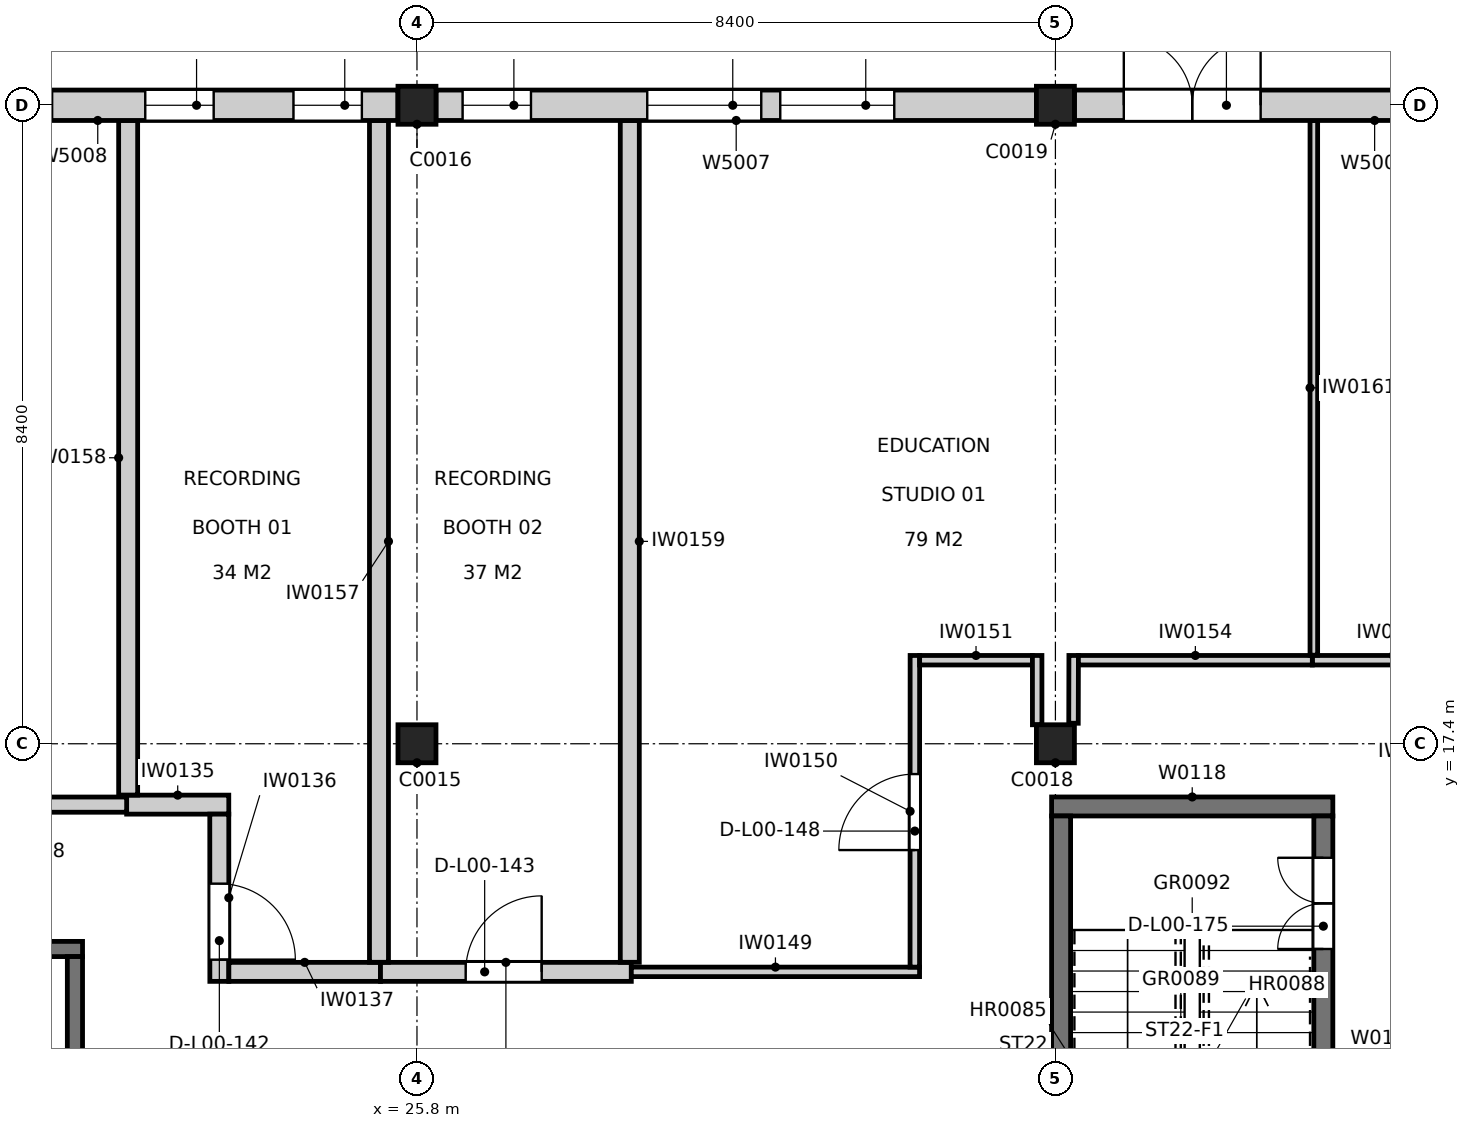
"""IFC4 building model, lengths in metres.
Left out: names, types, materials, properties, quantities, classifications, styles, units other than length and angle.
Written with IfcOpenShell. Run it as: python <this file> out.ifc"""

import sys

from ifc_helpers import new_model, si_unit, direction, frame, frame_2d, origin, origin_2d, place, context, subcontext, project, spatial, rectangle, extrude, element, fill, save


model = new_model("IFC4")
c1 = context("Model", 3, precision=1e-05, world=origin(), true_north=direction((0.0, 1.0)))
c2 = subcontext(c1, "Body", "Model", "MODEL_VIEW")
j1 = project(units=[si_unit("LENGTHUNIT", "METRE"), si_unit("PLANEANGLEUNIT", "RADIAN")], contexts=[c1])
p1 = place(None, origin())
s1 = spatial("IfcSite", under=j1, at=p1, CompositionType="ELEMENT")
p2 = place(p1, origin())
s2 = spatial("IfcBuilding", under=s1, at=p2, CompositionType="ELEMENT")
p3 = place(p2, origin())
s3 = spatial("IfcBuildingStorey", under=s2, at=p3, CompositionType="ELEMENT", Elevation=0.0)
for number, where, z_axis, x_axis in (
    (1, (25.8, 17.4, 0.0), (0.0, 0.0, 1.0), (1.0, 0.0, 0.0)),
    (2, (25.8, 25.8, 0.0), (0.0, 0.0, 1.0), (1.0, 0.0, 0.0)),
    (3, (34.2, 17.4, 0.0), (0.0, 0.0, 1.0), (1.0, 0.0, 0.0)),
    (4, (34.2, 25.8, 0.0), (0.0, 0.0, 1.0), (1.0, 0.0, 0.0)),
):
    element("IfcColumn", number, at=place(p3, frame(where, z_axis=z_axis, x_axis=x_axis)), inside=s3, PredefinedType="COLUMN", context=c2, shape_type="SweptSolid", body=[
        extrude(rectangle(XDim=0.5, YDim=0.5, at=origin_2d()), origin(), (0.0, 0.0, 1.0), 4.8),
    ])
p4 = place(p3, frame((34.15, 16.575, 0.0), z_axis=(0.0, 0.0, 1.0), x_axis=(1.0, 0.0, 0.0)))
e5 = element("IfcWall", 5, at=p4, inside=s3, PredefinedType="SOLIDWALL", context=c2, shape_type="SweptSolid", body=[
    extrude(rectangle(XDim=3.7, YDim=0.25, at=frame_2d((1.85, 0.0))), origin(), (0.0, 0.0, 1.0), 4.8),
])
p5 = place(p3, frame((34.275, 9.55, 0.0), z_axis=(0.0, 0.0, 1.0), x_axis=(0.0, 1.0, 0.0)))
e6 = element("IfcWall", 6, at=p5, inside=s3, PredefinedType="SOLIDWALL", context=c2, shape_type="SweptSolid", body=[
    extrude(rectangle(XDim=6.9, YDim=0.25, at=frame_2d((3.45, 0.0))), origin(), (0.0, 0.0, 1.0), 4.8),
])
p6 = place(p3, frame((37.725, 9.55, 0.0), z_axis=(0.0, 0.0, 1.0), x_axis=(0.0, 1.0, 0.0)))
e7 = element("IfcWall", 7, at=p6, inside=s3, PredefinedType="SOLIDWALL", context=c2, shape_type="SweptSolid", body=[
    extrude(rectangle(XDim=6.9, YDim=0.25, at=frame_2d((3.45, 0.0))), origin(), (0.0, 0.0, 1.0), 4.8),
])
p7 = place(p6, frame((5.15, 0.0, 0.0)))
e8 = element("IfcOpeningElement", 8, at=p7, cuts=e7, PredefinedType="OPENING", context=c2, shape_type="SweptSolid", body=[
    extrude(rectangle(XDim=1.2, YDim=2.1, at=frame_2d((0.6, 1.05))), frame((0.0, 0.135, 0.0), z_axis=(0.0, -1.0, 0.0), x_axis=(1.0, 0.0, 0.0)), (0.0, 0.0, 1.0), 0.27),
])
p8 = place(p3, frame((18.6, 14.7, 0.0), z_axis=(0.0, 0.0, 1.0), x_axis=(1.0, 0.0, 0.0)))
e9 = element("IfcWall", 9, at=p8, inside=s3, PredefinedType="SOLIDWALL", context=c2, shape_type="SweptSolid", body=[
    extrude(rectangle(XDim=2.8, YDim=0.2, at=frame_2d((1.4, 0.0))), origin(), (0.0, 0.0, 1.0), 4.8),
])
p9 = place(p8, frame((0.85, 0.0, 0.0)))
e10 = element("IfcOpeningElement", 10, at=p9, cuts=e9, PredefinedType="OPENING", context=c2, shape_type="SweptSolid", body=[
    extrude(rectangle(XDim=1.1, YDim=2.1, at=frame_2d((0.55, 1.05))), frame((0.0, 0.11, 0.0), z_axis=(0.0, -1.0, 0.0), x_axis=(1.0, 0.0, 0.0)), (0.0, 0.0, 1.0), 0.22),
])
p10 = place(p3, frame((21.3, 11.4, 0.0), z_axis=(0.0, 0.0, 1.0), x_axis=(0.0, 1.0, 0.0)))
e11 = element("IfcWall", 11, at=p10, inside=s3, PredefinedType="SOLIDWALL", context=c2, shape_type="SweptSolid", body=[
    extrude(rectangle(XDim=3.2, YDim=0.2, at=frame_2d((1.6, 0.0))), origin(), (0.0, 0.0, 1.0), 4.8),
])
p11 = place(p3, frame((21.98, 16.599, 0.0), z_axis=(0.0, 0.0, 1.0), x_axis=(1.0, 0.0, 0.0)))
e12 = element("IfcWall", 12, at=p11, inside=s3, PredefinedType="PARTITIONING", context=c2, shape_type="SweptSolid", body=[
    extrude(rectangle(XDim=1.344, YDim=0.25, at=frame_2d((0.672, 0.0))), origin(), (0.0, 0.0, 1.0), 4.64),
])
p12 = place(p3, frame((23.199, 16.474, 0.0), z_axis=(0.0, 0.0, 1.0), x_axis=(0.000443852597, -0.999999901497, 0.0)))
e13 = element("IfcWall", 13, at=p12, inside=s3, PredefinedType="PARTITIONING", context=c2, shape_type="SweptSolid", body=[
    extrude(rectangle(XDim=2.2, YDim=0.25, at=frame_2d((1.1, 0.0))), origin(), (0.0, 0.0, 1.0), 4.04),
])
p13 = place(p12, frame((0.915, 0.0, 0.0)))
e14 = element("IfcOpeningElement", 14, at=p13, cuts=e13, PredefinedType="OPENING", context=c2, shape_type="SweptSolid", body=[
    extrude(rectangle(XDim=1.0, YDim=2.1, at=frame_2d((0.5, 1.05))), frame((0.0, 0.135, 0.0), z_axis=(0.0, -1.0, 0.0), x_axis=(1.0, 0.0, 0.0)), (0.0, 0.0, 1.0), 0.27),
])
p14 = place(p3, frame((23.325, 14.399, 0.0), z_axis=(0.0, 0.0, 1.0), x_axis=(1.0, 0.0, 0.0)))
e15 = element("IfcWall", 15, at=p14, inside=s3, PredefinedType="PARTITIONING", context=c2, shape_type="SweptSolid", body=[
    extrude(rectangle(XDim=1.995, YDim=0.25, at=frame_2d((0.998, 0.0))), origin(), (0.0, 0.0, 1.0), 4.04),
])
p15 = place(p3, frame((25.32, 14.399, 0.0), z_axis=(0.0, 0.0, 1.0), x_axis=(1.0, 0.0, 0.0)))
e16 = element("IfcWall", 16, at=p15, inside=s3, PredefinedType="PARTITIONING", context=c2, shape_type="SweptSolid", body=[
    extrude(rectangle(XDim=3.3, YDim=0.25, at=frame_2d((1.65, 0.0))), origin(), (0.0, 0.0, 1.0), 3.84),
])
p16 = place(p15, frame((1.121, 0.0, 0.0)))
e17 = element("IfcOpeningElement", 17, at=p16, cuts=e16, PredefinedType="OPENING", context=c2, shape_type="SweptSolid", body=[
    extrude(rectangle(XDim=1.0, YDim=2.1, at=frame_2d((0.5, 1.05))), frame((0.0, 0.135, 0.0), z_axis=(0.0, -1.0, 0.0), x_axis=(1.0, 0.0, 0.0)), (0.0, 0.0, 1.0), 0.27),
])
p17 = place(p3, frame((37.58, 18.499, 0.0), z_axis=(0.0, 0.0, 1.0), x_axis=(1.0, 0.0, 0.0)))
e18 = element("IfcWall", 18, at=p17, inside=s3, PredefinedType="PARTITIONING", context=c2, shape_type="SweptSolid", body=[
    extrude(rectangle(XDim=2.131, YDim=0.125, at=frame_2d((1.066, 0.0))), origin(), (0.0, 0.0, 1.0), 4.64),
])
p18 = place(p3, frame((16.701, 16.599, 0.0), z_axis=(0.0, 0.0, 1.0), x_axis=(1.0, 0.0, 0.0)))
e19 = element("IfcWall", 19, at=p18, inside=s3, PredefinedType="PARTITIONING", context=c2, shape_type="SweptSolid", body=[
    extrude(rectangle(XDim=5.279, YDim=0.2, at=frame_2d((2.64, 0.0))), origin(), (0.0, 0.0, 1.0), 3.84),
])
p19 = place(p18, frame((1.039, 0.0, 0.0)))
e20 = element("IfcOpeningElement", 20, at=p19, cuts=e19, PredefinedType="OPENING", context=c2, shape_type="SweptSolid", body=[
    extrude(rectangle(XDim=0.9, YDim=2.1, at=frame_2d((0.45, 1.05))), frame((0.0, 0.11, 0.0), z_axis=(0.0, -1.0, 0.0), x_axis=(1.0, 0.0, 0.0)), (0.0, 0.0, 1.0), 0.22),
])
p20 = place(p3, frame((28.62, 14.399, 0.0), z_axis=(0.0, 0.0, 1.0), x_axis=(1.0, 0.0, 0.0)))
e21 = element("IfcWall", 21, at=p20, inside=s3, PredefinedType="PARTITIONING", context=c2, shape_type="SweptSolid", body=[
    extrude(rectangle(XDim=3.792, YDim=0.125, at=frame_2d((1.896, 0.0))), origin(), (0.0, 0.0, 1.0), 4.04),
])
p21 = place(p3, frame((32.35, 14.461, 0.0), z_axis=(0.0, 0.0, 1.0), x_axis=(0.000238180296, 0.999999971635, 0.0)))
e22 = element("IfcWall", 22, at=p21, inside=s3, PredefinedType="PARTITIONING", context=c2, shape_type="SweptSolid", body=[
    extrude(rectangle(XDim=4.1, YDim=0.125, at=frame_2d((2.05, 0.0))), origin(), (0.0, 0.0, 1.0), 3.84),
])
p22 = place(p21, frame((1.54, 0.0, 0.0)))
e23 = element("IfcOpeningElement", 23, at=p22, cuts=e22, PredefinedType="OPENING", context=c2, shape_type="SweptSolid", body=[
    extrude(rectangle(XDim=1.0, YDim=2.1, at=frame_2d((0.5, 1.05))), frame((0.0, 0.073, 0.0), z_axis=(0.0, -1.0, 0.0), x_axis=(1.0, 0.0, 0.0)), (0.0, 0.0, 1.0), 0.145),
])
p23 = place(p3, frame((32.414, 18.499, 0.0), z_axis=(0.0, 0.0, 1.0), x_axis=(1.0, 0.0, 0.0)))
e24 = element("IfcWall", 24, at=p23, inside=s3, PredefinedType="PARTITIONING", context=c2, shape_type="SweptSolid", body=[
    extrude(rectangle(XDim=1.484, YDim=0.125, at=frame_2d((0.742, 0.0))), origin(), (0.0, 0.0, 1.0), 4.64),
])
p24 = place(p3, frame((33.96, 18.562, 0.0), z_axis=(0.0, 0.0, 1.0), x_axis=(0.0, -1.0, 0.0)))
e25 = element("IfcWall", 25, at=p24, inside=s3, PredefinedType="PARTITIONING", context=c2, shape_type="SweptSolid", body=[
    extrude(rectangle(XDim=0.912, YDim=0.125, at=frame_2d((0.456, 0.0))), origin(), (0.0, 0.0, 1.0), 3.84),
])
p25 = place(p3, frame((34.438, 17.67, 0.0), z_axis=(0.0, 0.0, 1.0), x_axis=(0.002464395583, 0.999996963373, 0.0)))
e26 = element("IfcWall", 26, at=p25, inside=s3, PredefinedType="PARTITIONING", context=c2, shape_type="SweptSolid", body=[
    extrude(rectangle(XDim=0.892, YDim=0.125, at=frame_2d((0.446, 0.0))), origin(), (0.0, 0.0, 1.0), 3.84),
])
p26 = place(p3, frame((34.502, 18.499, 0.0), z_axis=(0.0, 0.0, 1.0), x_axis=(1.0, 0.0, 0.0)))
e27 = element("IfcWall", 27, at=p26, inside=s3, PredefinedType="PARTITIONING", context=c2, shape_type="SweptSolid", body=[
    extrude(rectangle(XDim=3.078, YDim=0.125, at=frame_2d((1.539, 0.0))), origin(), (0.0, 0.0, 1.0), 4.64),
])
p27 = place(p3, frame((25.3, 25.6, 0.0), z_axis=(0.0, 0.0, 1.0), x_axis=(0.0, -1.0, 0.0)))
e28 = element("IfcWall", 28, at=p27, inside=s3, PredefinedType="PARTITIONING", context=c2, shape_type="SweptSolid", body=[
    extrude(rectangle(XDim=11.075, YDim=0.25, at=frame_2d((5.538, 0.0))), origin(), (0.0, 0.0, 1.0), 3.84),
])
p28 = place(p3, frame((22.0, 16.725, 0.0), z_axis=(0.0, 0.0, 1.0), x_axis=(0.0, 1.0, 0.0)))
e29 = element("IfcWall", 29, at=p28, inside=s3, PredefinedType="PARTITIONING", context=c2, shape_type="SweptSolid", body=[
    extrude(rectangle(XDim=8.875, YDim=0.25, at=frame_2d((4.438, 0.0))), origin(), (0.0, 0.0, 1.0), 3.84),
])
p29 = place(p3, frame((28.6, 25.6, 0.0), z_axis=(0.0, 0.0, 1.0), x_axis=(0.0, -1.0, 0.0)))
e30 = element("IfcWall", 30, at=p29, inside=s3, PredefinedType="PARTITIONING", context=c2, shape_type="SweptSolid", body=[
    extrude(rectangle(XDim=11.075, YDim=0.25, at=frame_2d((5.538, 0.0))), origin(), (0.0, 0.0, 1.0), 3.84),
])
p30 = place(p3, frame((37.6, 18.565, 0.0), z_axis=(0.0, 0.0, 1.0), x_axis=(0.0, 1.0, 0.0)))
e31 = element("IfcWall", 31, at=p30, inside=s3, PredefinedType="PARTITIONING", context=c2, shape_type="SweptSolid", body=[
    extrude(rectangle(XDim=7.035, YDim=0.1, at=frame_2d((3.518, 0.0))), origin(), (0.0, 0.0, 1.0), 4.04),
])
p31 = place(p3, frame((42.35, 25.8, 0.0), z_axis=(0.0, 0.0, 1.0), x_axis=(-1.0, 0.0, 0.0)))
e32 = element("IfcWall", 32, at=p31, inside=s3, PredefinedType="SOLIDWALL", context=c2, shape_type="SweptSolid", body=[
    extrude(rectangle(XDim=7.9, YDim=0.4, at=frame_2d((3.95, 0.0))), origin(), (0.0, 0.0, 1.0), 3.84),
])
p32 = place(p31, frame((7.25, 0.0, 0.0), z_axis=(0.0, 0.0, 1.0), x_axis=(-1.0, 0.0, 0.0)))
e33 = element("IfcOpeningElement", 33, at=p32, cuts=e32, PredefinedType="OPENING", context=c2, shape_type="SweptSolid", body=[
    extrude(rectangle(XDim=1.8, YDim=2.1, at=frame_2d((0.9, 1.05))), frame((0.0, 0.21, 0.0), z_axis=(0.0, -1.0, 0.0), x_axis=(1.0, 0.0, 0.0)), (0.0, 0.0, 1.0), 0.42),
])
p33 = place(p31, frame((2.15, 0.0, 0.9)))
e34 = element("IfcOpeningElement", 34, at=p33, cuts=e32, PredefinedType="OPENING", context=c2, shape_type="SweptSolid", body=[
    extrude(rectangle(XDim=1.5, YDim=1.5, at=frame_2d((0.75, 0.75))), frame((0.0, 0.21, 0.0), z_axis=(0.0, -1.0, 0.0), x_axis=(1.0, 0.0, 0.0)), (0.0, 0.0, 1.0), 0.42),
])
p34 = place(p3, frame((33.95, 25.8, 0.0), z_axis=(0.0, 0.0, 1.0), x_axis=(-1.0, 0.0, 0.0)))
e35 = element("IfcWall", 35, at=p34, inside=s3, PredefinedType="SOLIDWALL", context=c2, shape_type="SweptSolid", body=[
    extrude(rectangle(XDim=7.9, YDim=0.4, at=frame_2d((3.95, 0.0))), origin(), (0.0, 0.0, 1.0), 3.84),
])
p35 = place(p34, frame((6.65, 0.0, 1.5)))
e36 = element("IfcOpeningElement", 36, at=p35, cuts=e35, PredefinedType="OPENING", context=c2, shape_type="SweptSolid", body=[
    extrude(rectangle(XDim=0.9, YDim=1.2, at=frame_2d((0.45, 0.6))), frame((0.0, 0.21, 0.0), z_axis=(0.0, -1.0, 0.0), x_axis=(1.0, 0.0, 0.0)), (0.0, 0.0, 1.0), 0.42),
])
p36 = place(p34, frame((3.62, 0.0, 0.9)))
e37 = element("IfcOpeningElement", 37, at=p36, cuts=e35, PredefinedType="OPENING", context=c2, shape_type="SweptSolid", body=[
    extrude(rectangle(XDim=1.5, YDim=1.5, at=frame_2d((0.75, 0.75))), frame((0.0, 0.21, 0.0), z_axis=(0.0, -1.0, 0.0), x_axis=(1.0, 0.0, 0.0)), (0.0, 0.0, 1.0), 0.42),
])
p37 = place(p34, frame((1.87, 0.0, 0.9)))
e38 = element("IfcOpeningElement", 38, at=p37, cuts=e35, PredefinedType="OPENING", context=c2, shape_type="SweptSolid", body=[
    extrude(rectangle(XDim=1.5, YDim=1.5, at=frame_2d((0.75, 0.75))), frame((0.0, 0.21, 0.0), z_axis=(0.0, -1.0, 0.0), x_axis=(1.0, 0.0, 0.0)), (0.0, 0.0, 1.0), 0.42),
])
p38 = place(p3, frame((25.55, 25.8, 0.0), z_axis=(0.0, 0.0, 1.0), x_axis=(-1.0, 0.0, 0.0)))
e39 = element("IfcWall", 39, at=p38, inside=s3, PredefinedType="SOLIDWALL", context=c2, shape_type="SweptSolid", body=[
    extrude(rectangle(XDim=7.9, YDim=0.4, at=frame_2d((3.95, 0.0))), origin(), (0.0, 0.0, 1.0), 3.84),
])
p39 = place(p38, frame((6.65, 0.0, 1.5)))
e40 = element("IfcOpeningElement", 40, at=p39, cuts=e39, PredefinedType="OPENING", context=c2, shape_type="SweptSolid", body=[
    extrude(rectangle(XDim=0.9, YDim=1.2, at=frame_2d((0.45, 0.6))), frame((0.0, 0.21, 0.0), z_axis=(0.0, -1.0, 0.0), x_axis=(1.0, 0.0, 0.0)), (0.0, 0.0, 1.0), 0.42),
])
p40 = place(p38, frame((4.55, 0.0, 1.5)))
e41 = element("IfcOpeningElement", 41, at=p40, cuts=e39, PredefinedType="OPENING", context=c2, shape_type="SweptSolid", body=[
    extrude(rectangle(XDim=0.9, YDim=1.2, at=frame_2d((0.45, 0.6))), frame((0.0, 0.21, 0.0), z_axis=(0.0, -1.0, 0.0), x_axis=(1.0, 0.0, 0.0)), (0.0, 0.0, 1.0), 0.42),
])
p41 = place(p38, frame((2.425, 0.0, 1.5)))
e42 = element("IfcOpeningElement", 42, at=p41, cuts=e39, PredefinedType="OPENING", context=c2, shape_type="SweptSolid", body=[
    extrude(rectangle(XDim=0.9, YDim=1.2, at=frame_2d((0.45, 0.6))), frame((0.0, 0.21, 0.0), z_axis=(0.0, -1.0, 0.0), x_axis=(1.0, 0.0, 0.0)), (0.0, 0.0, 1.0), 0.42),
])
p42 = place(p38, frame((0.475, 0.0, 1.5)))
e43 = element("IfcOpeningElement", 43, at=p42, cuts=e39, PredefinedType="OPENING", context=c2, shape_type="SweptSolid", body=[
    extrude(rectangle(XDim=0.9, YDim=1.2, at=frame_2d((0.45, 0.6))), frame((0.0, 0.21, 0.0), z_axis=(0.0, -1.0, 0.0), x_axis=(1.0, 0.0, 0.0)), (0.0, 0.0, 1.0), 0.42),
])
p43 = place(p13, origin())
e44 = element("IfcDoor", 44, at=p43, inside=s3, OperationType="SINGLE_SWING_RIGHT", PredefinedType="DOOR", context=c2, shape_type="SweptSolid", body=[
    extrude(rectangle(XDim=1.0, YDim=2.1, at=frame_2d((0.5, 1.05))), frame((0.0, 0.025, 0.0), z_axis=(0.0, -1.0, 0.0), x_axis=(1.0, 0.0, 0.0)), (0.0, 0.0, 1.0), 0.05),
])
fill(e14, e44)
p44 = place(p16, origin())
e45 = element("IfcDoor", 45, at=p44, inside=s3, OperationType="SINGLE_SWING_RIGHT", PredefinedType="DOOR", context=c2, shape_type="SweptSolid", body=[
    extrude(rectangle(XDim=1.0, YDim=2.1, at=frame_2d((0.5, 1.05))), frame((0.0, 0.025, 0.0), z_axis=(0.0, -1.0, 0.0), x_axis=(1.0, 0.0, 0.0)), (0.0, 0.0, 1.0), 0.05),
])
fill(e17, e45)
p45 = place(p22, origin())
e46 = element("IfcDoor", 46, at=p45, inside=s3, OperationType="SINGLE_SWING_LEFT", PredefinedType="DOOR", context=c2, shape_type="SweptSolid", body=[
    extrude(rectangle(XDim=1.0, YDim=2.1, at=frame_2d((0.5, 1.05))), frame((0.0, 0.025, 0.0), z_axis=(0.0, -1.0, 0.0), x_axis=(1.0, 0.0, 0.0)), (0.0, 0.0, 1.0), 0.05),
])
fill(e23, e46)
p46 = place(p7, origin())
e47 = element("IfcDoor", 47, at=p46, inside=s3, OperationType="DOUBLE_DOOR_SINGLE_SWING", PredefinedType="DOOR", context=c2, shape_type="SweptSolid", body=[
    extrude(rectangle(XDim=1.2, YDim=2.1, at=frame_2d((0.6, 1.05))), frame((0.0, 0.025, 0.0), z_axis=(0.0, -1.0, 0.0), x_axis=(1.0, 0.0, 0.0)), (0.0, 0.0, 1.0), 0.05),
])
fill(e8, e47)
p47 = place(p32, origin())
e48 = element("IfcDoor", 48, at=p47, inside=s3, OperationType="DOUBLE_DOOR_SINGLE_SWING", PredefinedType="DOOR", context=c2, shape_type="SweptSolid", body=[
    extrude(rectangle(XDim=1.8, YDim=2.1, at=frame_2d((0.9, 1.05))), frame((0.0, 0.025, 0.0), z_axis=(0.0, -1.0, 0.0), x_axis=(1.0, 0.0, 0.0)), (0.0, 0.0, 1.0), 0.05),
])
fill(e33, e48)
p48 = place(p35, origin())
e49 = element("IfcWindow", 49, at=p48, inside=s3, PartitioningType="SINGLE_PANEL", PredefinedType="WINDOW", context=c2, shape_type="SweptSolid", body=[
    extrude(rectangle(XDim=0.9, YDim=1.2, at=frame_2d((0.45, 0.6))), frame((0.0, 0.15, 0.0), z_axis=(0.0, -1.0, 0.0), x_axis=(1.0, 0.0, 0.0)), (0.0, 0.0, 1.0), 0.06),
])
fill(e36, e49)
p49 = place(p36, origin())
e50 = element("IfcWindow", 50, at=p49, inside=s3, PartitioningType="DOUBLE_PANEL_VERTICAL", PredefinedType="WINDOW", context=c2, shape_type="SweptSolid", body=[
    extrude(rectangle(XDim=1.5, YDim=1.5, at=frame_2d((0.75, 0.75))), frame((0.0, 0.15, 0.0), z_axis=(0.0, -1.0, 0.0), x_axis=(1.0, 0.0, 0.0)), (0.0, 0.0, 1.0), 0.06),
])
fill(e37, e50)
p50 = place(p37, origin())
e51 = element("IfcWindow", 51, at=p50, inside=s3, PartitioningType="DOUBLE_PANEL_VERTICAL", PredefinedType="WINDOW", context=c2, shape_type="SweptSolid", body=[
    extrude(rectangle(XDim=1.5, YDim=1.5, at=frame_2d((0.75, 0.75))), frame((0.0, 0.15, 0.0), z_axis=(0.0, -1.0, 0.0), x_axis=(1.0, 0.0, 0.0)), (0.0, 0.0, 1.0), 0.06),
])
fill(e38, e51)
p51 = place(p41, origin())
e52 = element("IfcWindow", 52, at=p51, inside=s3, PartitioningType="SINGLE_PANEL", PredefinedType="WINDOW", context=c2, shape_type="SweptSolid", body=[
    extrude(rectangle(XDim=0.9, YDim=1.2, at=frame_2d((0.45, 0.6))), frame((0.0, 0.15, 0.0), z_axis=(0.0, -1.0, 0.0), x_axis=(1.0, 0.0, 0.0)), (0.0, 0.0, 1.0), 0.06),
])
fill(e42, e52)
p52 = place(p42, origin())
e53 = element("IfcWindow", 53, at=p52, inside=s3, PartitioningType="SINGLE_PANEL", PredefinedType="WINDOW", context=c2, shape_type="SweptSolid", body=[
    extrude(rectangle(XDim=0.9, YDim=1.2, at=frame_2d((0.45, 0.6))), frame((0.0, 0.15, 0.0), z_axis=(0.0, -1.0, 0.0), x_axis=(1.0, 0.0, 0.0)), (0.0, 0.0, 1.0), 0.06),
])
fill(e43, e53)
save(model, sys.argv[1])
